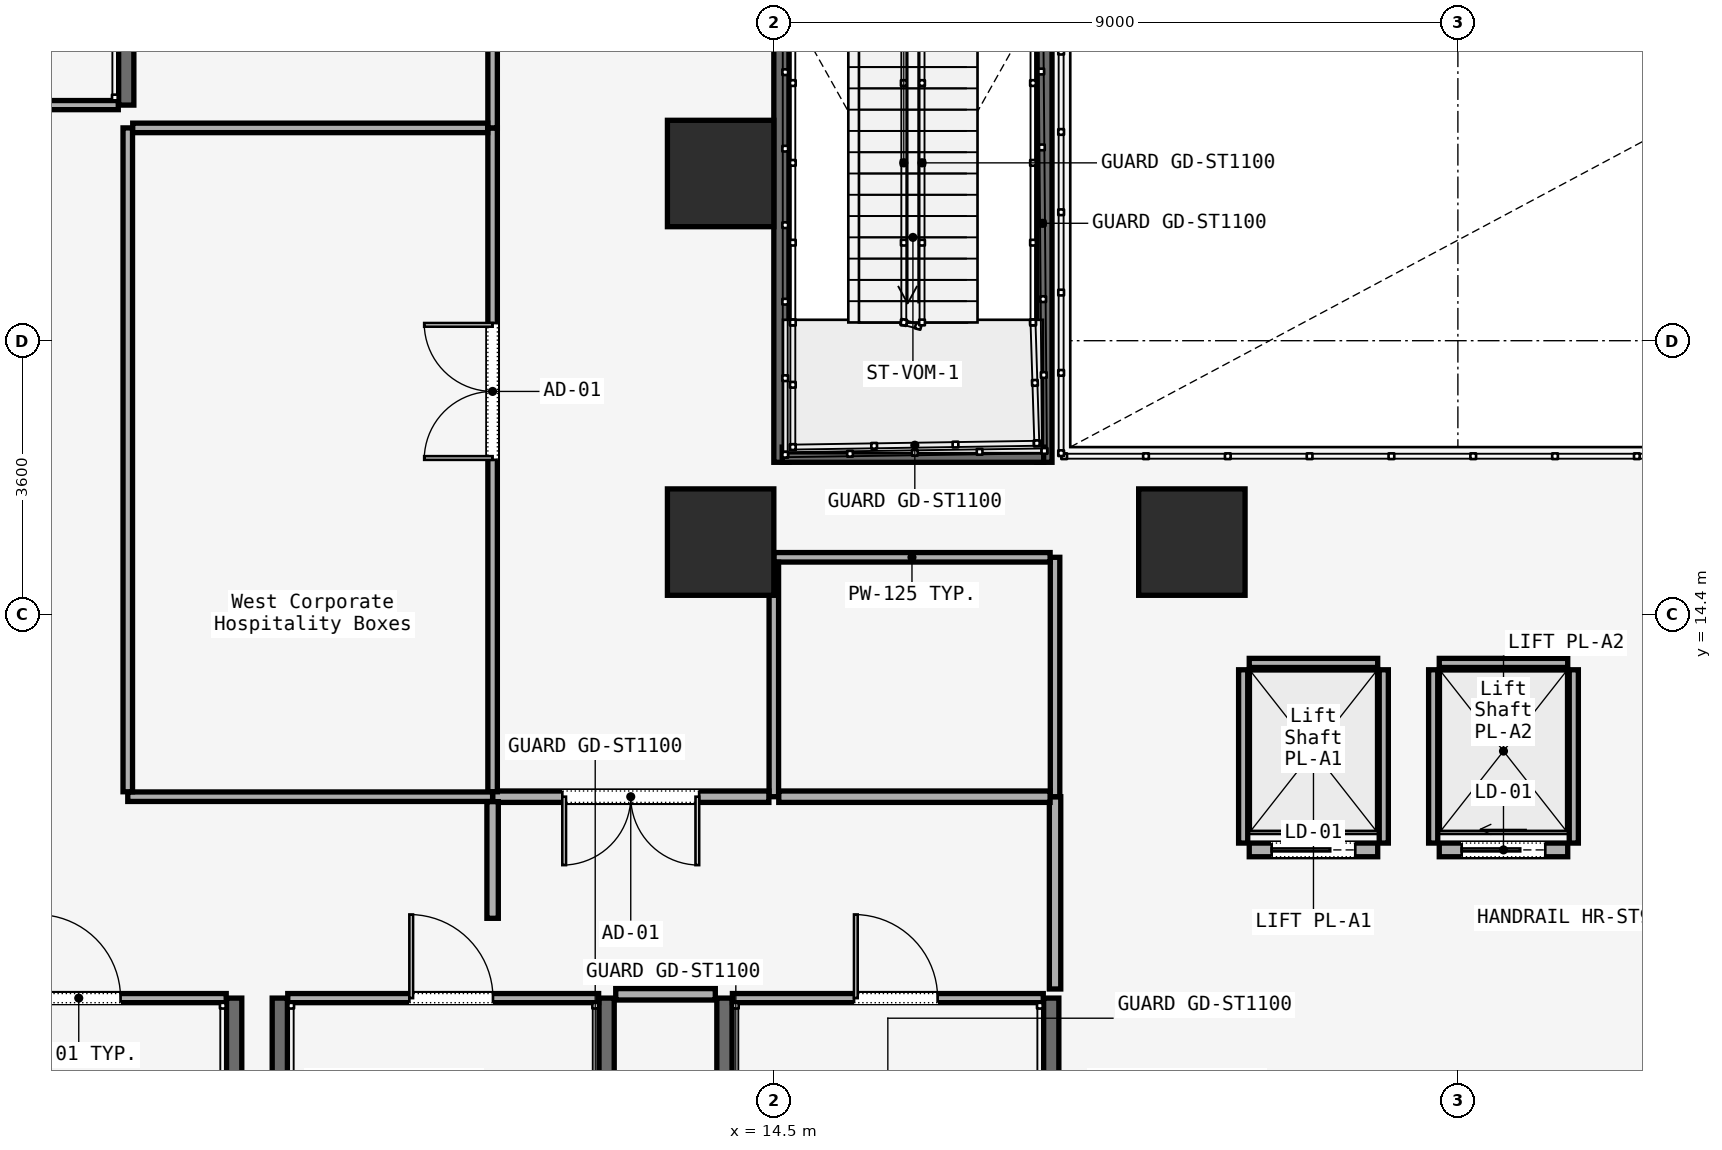
"""IFC4 building model, lengths in metres.
Left out: names, types, materials, properties, quantities, classifications, styles, units other than length and angle.
Written with IfcOpenShell. Run it as: python <this file> out.ifc"""

import sys

from ifc_helpers import new_model, si_unit, direction, frame, frame_2d, origin, origin_2d, place, context, subcontext, project, spatial, rectangle, extrude, element, fill, save


model = new_model("IFC4")
c1 = context("Model", 3, precision=1e-05, world=origin(), true_north=direction((0.0, 1.0)))
c2 = subcontext(c1, "Body", "Model", "MODEL_VIEW")
j1 = project(units=[si_unit("LENGTHUNIT", "METRE"), si_unit("PLANEANGLEUNIT", "RADIAN")], contexts=[c1])
p1 = place(None, origin())
s1 = spatial("IfcSite", under=j1, at=p1, CompositionType="ELEMENT")
p2 = place(p1, origin())
s2 = spatial("IfcBuilding", under=s1, at=p2, CompositionType="ELEMENT")
p3 = place(p2, frame((0.0, 0.0, 12.0)))
s3 = spatial("IfcBuildingStorey", under=s2, at=p3, CompositionType="ELEMENT", Elevation=12.0)
for number, where, z_axis, x_axis in (
    (1, (13.8, 15.35, 0.0), (0.0, 0.0, 1.0), (1.0, 0.0, 0.0)),
    (2, (13.8, 20.2, 0.0), (0.0, 0.0, 1.0), (1.0, 0.0, 0.0)),
    (3, (20.0, 15.35, 0.0), (0.0, 0.0, 1.0), (1.0, 0.0, 0.0)),
):
    element("IfcColumn", number, at=place(p3, frame(where, z_axis=z_axis, x_axis=x_axis)), inside=s3, PredefinedType="COLUMN", context=c2, shape_type="SweptSolid", body=[
        extrude(rectangle(XDim=1.4, YDim=1.4, at=origin_2d()), origin(), (0.0, 0.0, 1.0), 5.7),
    ])
p4 = place(p3, frame((7.4, 9.35, 0.0), z_axis=(0.0, 0.0, 1.0), x_axis=(0.0, -1.0, 0.0)))
e4 = element("IfcWall", 4, at=p4, inside=s3, PredefinedType="SOLIDWALL", context=c2, shape_type="SweptSolid", body=[
    extrude(rectangle(XDim=8.5, YDim=0.2, at=frame_2d((4.25, 0.0))), origin(), (0.0, 0.0, 1.0), 6.0),
])
p5 = place(p3, frame((3.205, 9.35, 0.0), z_axis=(0.0, 0.0, 1.0), x_axis=(1.0, 0.0, 0.0)))
e5 = element("IfcWall", 5, at=p5, inside=s3, PredefinedType="SOLIDWALL", context=c2, shape_type="SweptSolid", body=[
    extrude(rectangle(XDim=4.09, YDim=0.12, at=frame_2d((2.045, 0.0))), origin(), (0.0, 0.0, 1.0), 4.819),
])
p6 = place(p5, frame((1.6, 0.0, 0.0)))
e6 = element("IfcOpeningElement", 6, at=p6, cuts=e5, PredefinedType="OPENING", context=c2, shape_type="SweptSolid", body=[
    extrude(rectangle(XDim=1.1, YDim=2.2, at=frame_2d((0.55, 1.1))), frame((0.0, 0.06, 0.0), z_axis=(0.0, -1.0, 0.0), x_axis=(1.0, 0.0, 0.0)), (0.0, 0.0, 1.0), 0.12),
])
for number, where, z_axis, x_axis in (
    (7, (8.0, 9.35, 0.0), (0.0, 0.0, 1.0), (0.0, -1.0, 0.0)),
    (8, (12.3, 9.35, 0.0), (0.0, 0.0, 1.0), (0.0, -1.0, 0.0)),
):
    element("IfcWall", number, at=place(p3, frame(where, z_axis=z_axis, x_axis=x_axis)), inside=s3, PredefinedType="SOLIDWALL", context=c2, shape_type="SweptSolid", body=[
        extrude(rectangle(XDim=8.5, YDim=0.2, at=frame_2d((4.25, 0.0))), origin(), (0.0, 0.0, 1.0), 6.0),
    ])
p7 = place(p3, frame((8.105, 9.35, 0.0), z_axis=(0.0, 0.0, 1.0), x_axis=(1.0, 0.0, 0.0)))
e9 = element("IfcWall", 9, at=p7, inside=s3, PredefinedType="SOLIDWALL", context=c2, shape_type="SweptSolid", body=[
    extrude(rectangle(XDim=4.09, YDim=0.12, at=frame_2d((2.045, 0.0))), origin(), (0.0, 0.0, 1.0), 4.819),
])
p8 = place(p7, frame((1.6, 0.0, 0.0)))
e10 = element("IfcOpeningElement", 10, at=p8, cuts=e9, PredefinedType="OPENING", context=c2, shape_type="SweptSolid", body=[
    extrude(rectangle(XDim=1.1, YDim=2.2, at=frame_2d((0.55, 1.1))), frame((0.0, 0.06, 0.0), z_axis=(0.0, -1.0, 0.0), x_axis=(1.0, 0.0, 0.0)), (0.0, 0.0, 1.0), 0.12),
])
for number, where, z_axis, x_axis in (
    (11, (13.85, 9.35, 0.0), (0.0, 0.0, 1.0), (0.0, -1.0, 0.0)),
    (12, (18.15, 9.35, 0.0), (0.0, 0.0, 1.0), (0.0, -1.0, 0.0)),
):
    element("IfcWall", number, at=place(p3, frame(where, z_axis=z_axis, x_axis=x_axis)), inside=s3, PredefinedType="SOLIDWALL", context=c2, shape_type="SweptSolid", body=[
        extrude(rectangle(XDim=8.5, YDim=0.2, at=frame_2d((4.25, 0.0))), origin(), (0.0, 0.0, 1.0), 6.0),
    ])
p9 = place(p3, frame((13.955, 9.35, 0.0), z_axis=(0.0, 0.0, 1.0), x_axis=(1.0, 0.0, 0.0)))
e13 = element("IfcWall", 13, at=p9, inside=s3, PredefinedType="SOLIDWALL", context=c2, shape_type="SweptSolid", body=[
    extrude(rectangle(XDim=4.09, YDim=0.12, at=frame_2d((2.045, 0.0))), origin(), (0.0, 0.0, 1.0), 4.819),
])
p10 = place(p9, frame((1.6, 0.0, 0.0)))
e14 = element("IfcOpeningElement", 14, at=p10, cuts=e13, PredefinedType="OPENING", context=c2, shape_type="SweptSolid", body=[
    extrude(rectangle(XDim=1.1, YDim=2.2, at=frame_2d((0.55, 1.1))), frame((0.0, 0.06, 0.0), z_axis=(0.0, -1.0, 0.0), x_axis=(1.0, 0.0, 0.0)), (0.0, 0.0, 1.0), 0.12),
])
p11 = place(p3, frame((5.98, 21.1, 0.0), z_axis=(0.0, 0.0, 1.0), x_axis=(0.0, 1.0, 0.0)))
e15 = element("IfcWall", 15, at=p11, inside=s3, PredefinedType="SOLIDWALL", context=c2, shape_type="SweptSolid", body=[
    extrude(rectangle(XDim=7.95, YDim=0.2, at=frame_2d((3.975, 0.0))), origin(), (0.0, 0.0, 1.0), 6.0),
])
p12 = place(p3, frame((5.875, 21.1, 0.0), z_axis=(0.0, 0.0, 1.0), x_axis=(-1.0, 0.0, 0.0)))
e16 = element("IfcWall", 16, at=p12, inside=s3, PredefinedType="SOLIDWALL", context=c2, shape_type="SweptSolid", body=[
    extrude(rectangle(XDim=3.37, YDim=0.12, at=frame_2d((1.685, 0.0))), origin(), (0.0, 0.0, 1.0), 4.819),
])
p13 = place(p12, frame((1.24, 0.0, 0.0)))
e17 = element("IfcOpeningElement", 17, at=p13, cuts=e16, PredefinedType="OPENING", context=c2, shape_type="SweptSolid", body=[
    extrude(rectangle(XDim=1.1, YDim=2.2, at=frame_2d((0.55, 1.1))), frame((0.0, 0.06, 0.0), z_axis=(0.0, -1.0, 0.0), x_axis=(1.0, 0.0, 0.0)), (0.0, 0.0, 1.0), 0.12),
])
for number, where, z_axis, x_axis in (
    (18, (14.6, 24.1, 0.0), (0.0, 0.0, 1.0), (0.0, -1.0, 0.0)),
    (19, (18.06, 24.1, 0.0), (0.0, 0.0, 1.0), (0.0, -1.0, 0.0)),
):
    element("IfcWall", number, at=place(p3, frame(where, z_axis=z_axis, x_axis=x_axis)), inside=s3, PredefinedType="SOLIDWALL", context=c2, shape_type="SweptSolid", body=[
        extrude(rectangle(XDim=7.7, YDim=0.2, at=frame_2d((3.85, 0.0))), origin(), (0.0, 0.0, 1.0), 6.0),
    ])
p14 = place(p3, frame((14.61, 16.5, 0.0), z_axis=(0.0, 0.0, 1.0), x_axis=(1.0, 0.0, 0.0)))
e20 = element("IfcWall", 20, at=p14, inside=s3, PredefinedType="SOLIDWALL", context=c2, shape_type="SweptSolid", body=[
    extrude(rectangle(XDim=3.44, YDim=0.2, at=frame_2d((1.72, 0.0))), origin(), (0.0, 0.0, 1.0), 6.0),
])
p15 = place(p3, frame((20.755, 11.3, 0.0), z_axis=(0.0, 0.0, 1.0), x_axis=(1.0, 0.0, 0.0)))
e21 = element("IfcWall", 21, at=p15, inside=s3, PredefinedType="SOLIDWALL", context=c2, shape_type="SweptSolid", body=[
    extrude(rectangle(XDim=1.69, YDim=0.18, at=frame_2d((0.845, 0.0))), origin(), (0.0, 0.0, 1.0), 4.819),
])
p16 = place(p15, frame((0.295, 0.0, 0.0)))
e22 = element("IfcOpeningElement", 22, at=p16, cuts=e21, PredefinedType="OPENING", context=c2, shape_type="SweptSolid", body=[
    extrude(rectangle(XDim=1.1, YDim=2.2, at=frame_2d((0.55, 1.1))), frame((0.0, 0.09, 0.0), z_axis=(0.0, -1.0, 0.0), x_axis=(1.0, 0.0, 0.0)), (0.0, 0.0, 1.0), 0.18),
])
p17 = place(p3, frame((20.755, 13.76, 0.0), z_axis=(0.0, 0.0, 1.0), x_axis=(1.0, 0.0, 0.0)))
e23 = element("IfcWall", 23, at=p17, inside=s3, PredefinedType="SOLIDWALL", context=c2, shape_type="SweptSolid", body=[
    extrude(rectangle(XDim=1.69, YDim=0.12, at=frame_2d((0.845, 0.0))), origin(), (0.0, 0.0, 1.0), 4.819),
])
for number, where, z_axis, x_axis in (
    (24, (20.675, 11.39, 0.0), (0.0, 0.0, 1.0), (0.0, 1.0, 0.0)),
    (25, (22.525, 11.39, 0.0), (0.0, 0.0, 1.0), (0.0, 1.0, 0.0)),
):
    element("IfcWall", number, at=place(p3, frame(where, z_axis=z_axis, x_axis=x_axis)), inside=s3, PredefinedType="SOLIDWALL", context=c2, shape_type="SweptSolid", body=[
        extrude(rectangle(XDim=2.28, YDim=0.12, at=frame_2d((1.14, 0.0))), origin(), (0.0, 0.0, 1.0), 4.819),
    ])
p18 = place(p3, frame((23.255, 11.3, 0.0), z_axis=(0.0, 0.0, 1.0), x_axis=(1.0, 0.0, 0.0)))
e26 = element("IfcWall", 26, at=p18, inside=s3, PredefinedType="SOLIDWALL", context=c2, shape_type="SweptSolid", body=[
    extrude(rectangle(XDim=1.69, YDim=0.18, at=frame_2d((0.845, 0.0))), origin(), (0.0, 0.0, 1.0), 4.819),
])
p19 = place(p18, frame((0.295, 0.0, 0.0)))
e27 = element("IfcOpeningElement", 27, at=p19, cuts=e26, PredefinedType="OPENING", context=c2, shape_type="SweptSolid", body=[
    extrude(rectangle(XDim=1.1, YDim=2.2, at=frame_2d((0.55, 1.1))), frame((0.0, 0.09, 0.0), z_axis=(0.0, -1.0, 0.0), x_axis=(1.0, 0.0, 0.0)), (0.0, 0.0, 1.0), 0.18),
])
p20 = place(p3, frame((23.255, 13.76, 0.0), z_axis=(0.0, 0.0, 1.0), x_axis=(1.0, 0.0, 0.0)))
e28 = element("IfcWall", 28, at=p20, inside=s3, PredefinedType="SOLIDWALL", context=c2, shape_type="SweptSolid", body=[
    extrude(rectangle(XDim=1.69, YDim=0.12, at=frame_2d((0.845, 0.0))), origin(), (0.0, 0.0, 1.0), 4.819),
])
for number, where, z_axis, x_axis in (
    (29, (23.175, 11.39, 0.0), (0.0, 0.0, 1.0), (0.0, 1.0, 0.0)),
    (30, (25.025, 11.39, 0.0), (0.0, 0.0, 1.0), (0.0, 1.0, 0.0)),
):
    element("IfcWall", number, at=place(p3, frame(where, z_axis=z_axis, x_axis=x_axis)), inside=s3, PredefinedType="SOLIDWALL", context=c2, shape_type="SweptSolid", body=[
        extrude(rectangle(XDim=2.28, YDim=0.12, at=frame_2d((1.14, 0.0))), origin(), (0.0, 0.0, 1.0), 4.819),
    ])
p21 = place(p3, frame((18.2, 9.47, 0.0), z_axis=(0.0, 0.0, 1.0), x_axis=(0.0, 1.0, 0.0)))
e31 = element("IfcWall", 31, at=p21, inside=s3, PredefinedType="PARTITIONING", context=c2, shape_type="SweptSolid", body=[
    extrude(rectangle(XDim=2.53, YDim=0.15, at=frame_2d((1.265, 0.0))), origin(), (0.0, 0.0, 1.0), 4.819),
])
p22 = place(p3, frame((18.2, 12.0, 0.0), z_axis=(0.0, 0.0, 1.0), x_axis=(0.0, 1.0, 0.0)))
e32 = element("IfcWall", 32, at=p22, inside=s3, PredefinedType="PARTITIONING", context=c2, shape_type="SweptSolid", body=[
    extrude(rectangle(XDim=3.15, YDim=0.125, at=frame_2d((1.575, 0.0))), origin(), (0.0, 0.0, 1.0), 4.819),
])
p23 = place(p3, frame((18.135, 15.15, 0.0), z_axis=(0.0, 0.0, 1.0), x_axis=(-1.0, 0.0, 0.0)))
e33 = element("IfcWall", 33, at=p23, inside=s3, PredefinedType="PARTITIONING", context=c2, shape_type="SweptSolid", body=[
    extrude(rectangle(XDim=3.635, YDim=0.125, at=frame_2d((1.817, 0.0))), origin(), (0.0, 0.0, 1.0), 4.819),
])
p24 = place(p3, frame((14.5, 15.085, 0.0), z_axis=(0.0, 0.0, 1.0), x_axis=(0.0, -1.0, 0.0)))
e34 = element("IfcWall", 34, at=p24, inside=s3, PredefinedType="PARTITIONING", context=c2, shape_type="SweptSolid", body=[
    extrude(rectangle(XDim=3.085, YDim=0.125, at=frame_2d((1.542, 0.0))), origin(), (0.0, 0.0, 1.0), 4.819),
])
p25 = place(p3, frame((14.435, 12.0, 0.0), z_axis=(0.0, 0.0, 1.0), x_axis=(-1.0, 0.0, 0.0)))
e35 = element("IfcWall", 35, at=p25, inside=s3, PredefinedType="PARTITIONING", context=c2, shape_type="SweptSolid", body=[
    extrude(rectangle(XDim=3.635, YDim=0.15, at=frame_2d((1.817, 0.0))), origin(), (0.0, 0.0, 1.0), 4.819),
])
p26 = place(p25, frame((0.917, 0.0, 0.0)))
e36 = element("IfcOpeningElement", 36, at=p26, cuts=e35, PredefinedType="OPENING", context=c2, shape_type="SweptSolid", body=[
    extrude(rectangle(XDim=1.8, YDim=2.3, at=frame_2d((0.9, 1.15))), frame((0.0, 0.075, 0.0), z_axis=(0.0, -1.0, 0.0), x_axis=(1.0, 0.0, 0.0)), (0.0, 0.0, 1.0), 0.15),
])
p27 = place(p3, frame((10.8, 12.065, 0.0), z_axis=(0.0, 0.0, 1.0), x_axis=(0.0, 1.0, 0.0)))
e37 = element("IfcWall", 37, at=p27, inside=s3, PredefinedType="PARTITIONING", context=c2, shape_type="SweptSolid", body=[
    extrude(rectangle(XDim=8.735, YDim=0.125, at=frame_2d((4.368, 0.0))), origin(), (0.0, 0.0, 1.0), 4.819),
])
p28 = place(p27, frame((4.367, 0.0, 0.0)))
e38 = element("IfcOpeningElement", 38, at=p28, cuts=e37, PredefinedType="OPENING", context=c2, shape_type="SweptSolid", body=[
    extrude(rectangle(XDim=1.8, YDim=2.3, at=frame_2d((0.9, 1.15))), frame((0.0, 0.062, 0.0), z_axis=(0.0, -1.0, 0.0), x_axis=(1.0, 0.0, 0.0)), (0.0, 0.0, 1.0), 0.125),
])
p29 = place(p3, frame((10.8, 20.8, 0.0), z_axis=(0.0, 0.0, 1.0), x_axis=(0.0, 1.0, 0.0)))
e39 = element("IfcWall", 39, at=p29, inside=s3, PredefinedType="PARTITIONING", context=c2, shape_type="SweptSolid", body=[
    extrude(rectangle(XDim=22.85, YDim=0.125, at=frame_2d((11.425, 0.0))), origin(), (0.0, 0.0, 1.0), 4.819),
])
p30 = place(p3, frame((10.8, 12.0, 0.0), z_axis=(0.0, 0.0, 1.0), x_axis=(-1.0, 0.0, 0.0)))
e40 = element("IfcWall", 40, at=p30, inside=s3, PredefinedType="PARTITIONING", context=c2, shape_type="SweptSolid", body=[
    extrude(rectangle(XDim=4.8, YDim=0.125, at=frame_2d((2.4, 0.0))), origin(), (0.0, 0.0, 1.0), 4.819),
])
p31 = place(p3, frame((6.0, 12.065, 0.0), z_axis=(0.0, 0.0, 1.0), x_axis=(0.0, 1.0, 0.0)))
e41 = element("IfcWall", 41, at=p31, inside=s3, PredefinedType="PARTITIONING", context=c2, shape_type="SweptSolid", body=[
    extrude(rectangle(XDim=8.735, YDim=0.125, at=frame_2d((4.368, 0.0))), origin(), (0.0, 0.0, 1.0), 4.819),
])
p32 = place(p3, frame((6.065, 20.8, 0.0), z_axis=(0.0, 0.0, 1.0), x_axis=(1.0, 0.0, 0.0)))
e42 = element("IfcWall", 42, at=p32, inside=s3, PredefinedType="PARTITIONING", context=c2, shape_type="SweptSolid", body=[
    extrude(rectangle(XDim=4.67, YDim=0.125, at=frame_2d((2.335, 0.0))), origin(), (0.0, 0.0, 1.0), 4.819),
])
p33 = place(p3, frame((13.73, 9.4, 0.0), z_axis=(0.0, 0.0, 1.0), x_axis=(-1.0, 0.0, 0.0)))
e43 = element("IfcWall", 43, at=p33, inside=s3, PredefinedType="PARTITIONING", context=c2, shape_type="SweptSolid", body=[
    extrude(rectangle(XDim=1.31, YDim=0.15, at=frame_2d((0.655, 0.0))), origin(), (0.0, 0.0, 1.0), 4.819),
])
p34 = place(p3, frame((10.8, 10.4, 0.0), z_axis=(0.0, 0.0, 1.0), x_axis=(0.0, 1.0, 0.0)))
e44 = element("IfcWall", 44, at=p34, inside=s3, PredefinedType="PARTITIONING", context=c2, shape_type="SweptSolid", body=[
    extrude(rectangle(XDim=1.535, YDim=0.15, at=frame_2d((0.768, 0.0))), origin(), (0.0, 0.0, 1.0), 4.819),
])
p35 = place(p3, frame((14.565, 12.0, 0.0), z_axis=(0.0, 0.0, 1.0), x_axis=(1.0, 0.0, 0.0)))
e45 = element("IfcWall", 45, at=p35, inside=s3, PredefinedType="PARTITIONING", context=c2, shape_type="SweptSolid", body=[
    extrude(rectangle(XDim=3.57, YDim=0.15, at=frame_2d((1.785, 0.0))), origin(), (0.0, 0.0, 1.0), 4.819),
])
p36 = place(p6, origin())
e46 = element("IfcDoor", 46, at=p36, inside=s3, OperationType="SINGLE_SWING_LEFT", PredefinedType="DOOR", context=c2, shape_type="SweptSolid", body=[
    extrude(rectangle(XDim=1.1, YDim=2.2, at=frame_2d((0.55, 1.1))), frame((0.0, 0.025, 0.0), z_axis=(0.0, -1.0, 0.0), x_axis=(1.0, 0.0, 0.0)), (0.0, 0.0, 1.0), 0.05),
])
fill(e6, e46)
p37 = place(p8, origin())
e47 = element("IfcDoor", 47, at=p37, inside=s3, OperationType="SINGLE_SWING_LEFT", PredefinedType="DOOR", context=c2, shape_type="SweptSolid", body=[
    extrude(rectangle(XDim=1.1, YDim=2.2, at=frame_2d((0.55, 1.1))), frame((0.0, 0.025, 0.0), z_axis=(0.0, -1.0, 0.0), x_axis=(1.0, 0.0, 0.0)), (0.0, 0.0, 1.0), 0.05),
])
fill(e10, e47)
p38 = place(p10, origin())
e48 = element("IfcDoor", 48, at=p38, inside=s3, OperationType="SINGLE_SWING_LEFT", PredefinedType="DOOR", context=c2, shape_type="SweptSolid", body=[
    extrude(rectangle(XDim=1.1, YDim=2.2, at=frame_2d((0.55, 1.1))), frame((0.0, 0.025, 0.0), z_axis=(0.0, -1.0, 0.0), x_axis=(1.0, 0.0, 0.0)), (0.0, 0.0, 1.0), 0.05),
])
fill(e14, e48)
p39 = place(p16, origin())
e49 = element("IfcDoor", 49, at=p39, inside=s3, OperationType="SLIDING_TO_LEFT", PredefinedType="DOOR", context=c2, shape_type="SweptSolid", body=[
    extrude(rectangle(XDim=1.1, YDim=2.2, at=frame_2d((0.55, 1.1))), frame((0.0, 0.025, 0.0), z_axis=(0.0, -1.0, 0.0), x_axis=(1.0, 0.0, 0.0)), (0.0, 0.0, 1.0), 0.05),
])
fill(e22, e49)
p40 = place(p19, origin())
e50 = element("IfcDoor", 50, at=p40, inside=s3, OperationType="SLIDING_TO_LEFT", PredefinedType="DOOR", context=c2, shape_type="SweptSolid", body=[
    extrude(rectangle(XDim=1.1, YDim=2.2, at=frame_2d((0.55, 1.1))), frame((0.0, 0.025, 0.0), z_axis=(0.0, -1.0, 0.0), x_axis=(1.0, 0.0, 0.0)), (0.0, 0.0, 1.0), 0.05),
])
fill(e27, e50)
p41 = place(p28, origin())
e51 = element("IfcDoor", 51, at=p41, inside=s3, OperationType="SINGLE_SWING_RIGHT", PredefinedType="DOOR", context=c2, shape_type="SweptSolid", body=[
    extrude(rectangle(XDim=1.8, YDim=2.3, at=frame_2d((0.9, 1.15))), frame((0.0, 0.025, 0.0), z_axis=(0.0, -1.0, 0.0), x_axis=(1.0, 0.0, 0.0)), (0.0, 0.0, 1.0), 0.05),
])
fill(e38, e51)
p42 = place(p26, origin())
e52 = element("IfcDoor", 52, at=p42, inside=s3, OperationType="SINGLE_SWING_RIGHT", PredefinedType="DOOR", context=c2, shape_type="SweptSolid", body=[
    extrude(rectangle(XDim=1.8, YDim=2.3, at=frame_2d((0.9, 1.15))), frame((0.0, 0.025, 0.0), z_axis=(0.0, -1.0, 0.0), x_axis=(1.0, 0.0, 0.0)), (0.0, 0.0, 1.0), 0.05),
])
fill(e36, e52)
save(model, sys.argv[1])
